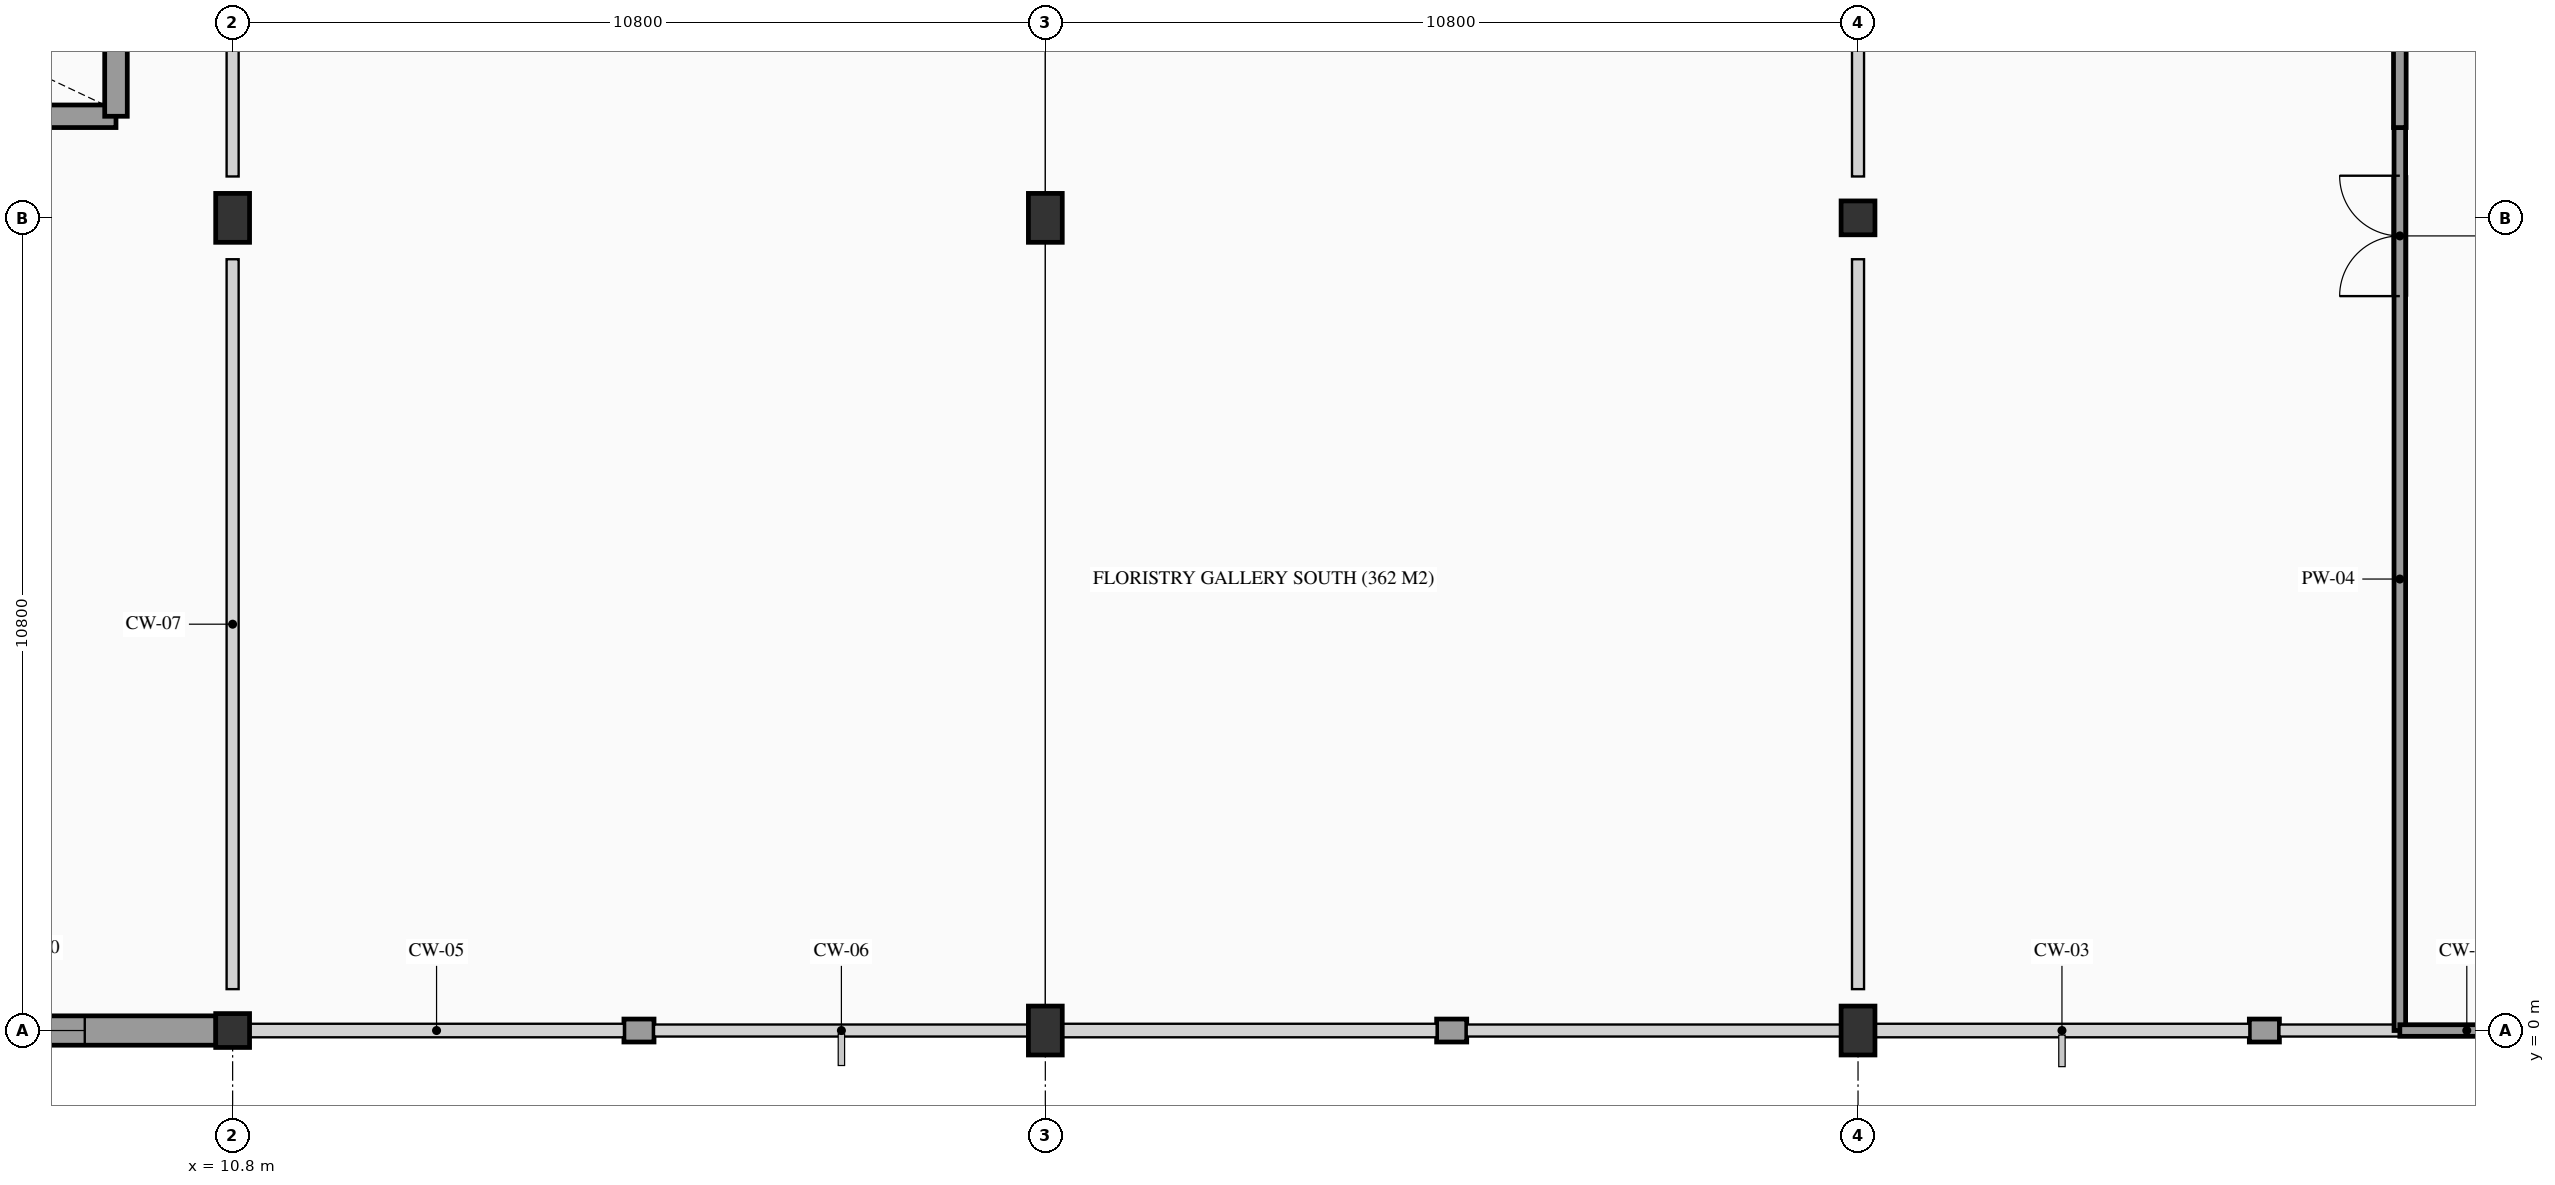
"""IFC4 building model, lengths in metres.
Left out: names, types, materials, properties, quantities, classifications, styles, units other than length and angle.
Written with IfcOpenShell. Run it as: python <this file> out.ifc"""

import sys

from ifc_helpers import new_model, si_unit, direction, frame, frame_2d, origin, origin_2d, place, context, subcontext, project, spatial, rectangle, extrude, element, fill, save


model = new_model("IFC4")
c1 = context("Model", 3, precision=1e-05, world=origin(), true_north=direction((0.0, 1.0)))
c2 = subcontext(c1, "Body", "Model", "MODEL_VIEW")
j1 = project(units=[si_unit("LENGTHUNIT", "METRE"), si_unit("PLANEANGLEUNIT", "RADIAN")], contexts=[c1])
p1 = place(None, origin())
s1 = spatial("IfcSite", under=j1, at=p1, CompositionType="ELEMENT")
p2 = place(p1, origin())
s2 = spatial("IfcBuilding", under=s1, at=p2, CompositionType="ELEMENT")
p3 = place(p2, frame((0.0, 0.0, 5.4)))
s3 = spatial("IfcBuildingStorey", under=s2, at=p3, CompositionType="ELEMENT", Elevation=5.4)
p4 = place(p3, frame((10.8, 0.0, 0.0), z_axis=(0.0, 0.0, 1.0), x_axis=(1.0, 0.0, 0.0)))
e1 = element("IfcColumn", 1, at=p4, inside=s3, PredefinedType="COLUMN", context=c2, shape_type="SweptSolid", body=[
    extrude(rectangle(XDim=0.45, YDim=0.45, at=origin_2d()), origin(), (0.0, 0.0, 1.0), 4.68),
])
for number, where, z_axis, x_axis in (
    (2, (10.8, 10.8, 0.0), (0.0, 0.0, 1.0), (1.0, 0.0, 0.0)),
    (3, (21.6, 0.0, 0.0), (0.0, 0.0, 1.0), (1.0, 0.0, 0.0)),
    (4, (21.6, 10.8, 0.0), (0.0, 0.0, 1.0), (1.0, 0.0, 0.0)),
    (5, (32.4, 0.0, 0.0), (0.0, 0.0, 1.0), (1.0, 0.0, 0.0)),
):
    element("IfcColumn", number, at=place(p3, frame(where, z_axis=z_axis, x_axis=x_axis)), inside=s3, PredefinedType="COLUMN", context=c2, shape_type="SweptSolid", body=[
        extrude(rectangle(XDim=0.45, YDim=0.65, at=origin_2d()), origin(), (0.0, 0.0, 1.0), 4.68),
    ])
p5 = place(p3, frame((32.4, 10.8, 0.0), z_axis=(0.0, 0.0, 1.0), x_axis=(1.0, 0.0, 0.0)))
e6 = element("IfcColumn", 6, at=p5, inside=s3, PredefinedType="COLUMN", context=c2, shape_type="SweptSolid", body=[
    extrude(rectangle(XDim=0.45, YDim=0.45, at=origin_2d()), origin(), (0.0, 0.0, 1.0), 4.68),
])
p6 = place(p3, frame((0.22, 0.0, 0.0), z_axis=(0.0, 0.0, 1.0), x_axis=(1.0, 0.0, 0.0)))
e7 = element("IfcWall", 7, at=p6, inside=s3, PredefinedType="STANDARD", context=c2, shape_type="SweptSolid", body=[
    extrude(rectangle(XDim=10.36, YDim=0.39, at=frame_2d((5.18, 0.0))), origin(), (0.0, 0.0, 1.0), 3.53),
])
p7 = place(p6, frame((1.465, 0.0, 0.95)))
e8 = element("IfcOpeningElement", 8, at=p7, cuts=e7, PredefinedType="OPENING", context=c2, shape_type="SweptSolid", body=[
    extrude(rectangle(XDim=1.17, YDim=1.95, at=frame_2d((0.585, 0.975))), frame((0.0, 0.205, 0.0), z_axis=(0.0, -1.0, 0.0), x_axis=(1.0, 0.0, 0.0)), (0.0, 0.0, 1.0), 0.41),
])
p8 = place(p6, frame((4.335, 0.0, 0.95)))
e9 = element("IfcOpeningElement", 9, at=p8, cuts=e7, PredefinedType="OPENING", context=c2, shape_type="SweptSolid", body=[
    extrude(rectangle(XDim=1.29, YDim=1.95, at=frame_2d((0.645, 0.975))), frame((0.0, 0.205, 0.0), z_axis=(0.0, -1.0, 0.0), x_axis=(1.0, 0.0, 0.0)), (0.0, 0.0, 1.0), 0.41),
])
p9 = place(p6, frame((7.205, 0.0, 0.95)))
e10 = element("IfcOpeningElement", 10, at=p9, cuts=e7, PredefinedType="OPENING", context=c2, shape_type="SweptSolid", body=[
    extrude(rectangle(XDim=1.41, YDim=1.95, at=frame_2d((0.705, 0.975))), frame((0.0, 0.205, 0.0), z_axis=(0.0, -1.0, 0.0), x_axis=(1.0, 0.0, 0.0)), (0.0, 0.0, 1.0), 0.41),
])
for number, where, z_axis, x_axis in (
    (11, (16.0, 0.0, 0.0), (0.0, 0.0, 1.0), (1.0, 0.0, 0.0)),
    (12, (26.8, 0.0, 0.0), (0.0, 0.0, 1.0), (1.0, 0.0, 0.0)),
    (13, (37.6, 0.0, 0.0), (0.0, 0.0, 1.0), (1.0, 0.0, 0.0)),
):
    element("IfcWall", number, at=place(p3, frame(where, z_axis=z_axis, x_axis=x_axis)), inside=s3, PredefinedType="STANDARD", context=c2, shape_type="SweptSolid", body=[
        extrude(rectangle(XDim=0.4, YDim=0.305, at=frame_2d((0.2, 0.0))), origin(), (0.0, 0.0, 1.0), 3.53),
    ])
p10 = place(p3, frame((1.35, 12.15, 0.0), z_axis=(0.0, 0.0, 1.0), x_axis=(1.0, 0.0, 0.0)))
e14 = element("IfcWall", 14, at=p10, inside=s3, PredefinedType="SHEAR", context=c2, shape_type="SweptSolid", body=[
    extrude(rectangle(XDim=7.9, YDim=0.3, at=frame_2d((3.95, 0.0))), origin(), (0.0, 0.0, 1.0), 4.68),
])
p11 = place(p3, frame((9.25, 12.15, 0.0), z_axis=(0.0, 0.0, 1.0), x_axis=(0.0, 1.0, 0.0)))
e15 = element("IfcWall", 15, at=p11, inside=s3, PredefinedType="SHEAR", context=c2, shape_type="SweptSolid", body=[
    extrude(rectangle(XDim=3.9, YDim=0.3, at=frame_2d((1.95, 0.0))), origin(), (0.0, 0.0, 1.0), 4.68),
])
p12 = place(p3, frame((39.6, 0.0, 0.0), z_axis=(0.0, 0.0, 1.0), x_axis=(0.0, 1.0, 0.0)))
e16 = element("IfcWall", 16, at=p12, inside=s3, PredefinedType="PARTITIONING", context=c2, shape_type="SweptSolid", body=[
    extrude(rectangle(XDim=12.0, YDim=0.154, at=frame_2d((6.0, 0.0))), origin(), (0.0, 0.0, 1.0), 3.23),
])
p13 = place(p12, frame((9.76, 0.0, 0.0)))
e17 = element("IfcOpeningElement", 17, at=p13, cuts=e16, PredefinedType="OPENING", context=c2, shape_type="SweptSolid", body=[
    extrude(rectangle(XDim=1.6, YDim=2.2, at=frame_2d((0.8, 1.1))), frame((0.0, 0.087, 0.0), z_axis=(0.0, -1.0, 0.0), x_axis=(1.0, 0.0, 0.0)), (0.0, 0.0, 1.0), 0.174),
])
p14 = place(p3, frame((39.6, 0.0, 0.0), z_axis=(0.0, 0.0, 1.0), x_axis=(1.0, 0.0, 0.0)))
e18 = element("IfcWall", 18, at=p14, inside=s3, PredefinedType="PARTITIONING", context=c2, shape_type="SweptSolid", body=[
    extrude(rectangle(XDim=3.6, YDim=0.154, at=frame_2d((1.8, 0.0))), origin(), (0.0, 0.0, 1.0), 3.23),
])
p15 = place(p3, frame((39.6, 12.0, 0.0), z_axis=(0.0, 0.0, 1.0), x_axis=(0.0, 1.0, 0.0)))
e19 = element("IfcWall", 19, at=p15, inside=s3, PredefinedType="PARTITIONING", context=c2, shape_type="SweptSolid", body=[
    extrude(rectangle(XDim=4.8, YDim=0.168, at=frame_2d((2.4, 0.0))), origin(), (0.0, 0.0, 1.0), 3.23),
])
p16 = place(p9, frame((1.41, 0.0, 0.0), z_axis=(0.0, 0.0, 1.0), x_axis=(-1.0, 0.0, 0.0)))
e20 = element("IfcWindow", 20, at=p16, inside=s3, PartitioningType="SINGLE_PANEL", PredefinedType="WINDOW", context=c2, shape_type="SweptSolid", body=[
    extrude(rectangle(XDim=1.41, YDim=1.95, at=frame_2d((0.705, 0.975))), frame((0.0, 0.03, 0.0), z_axis=(0.0, -1.0, 0.0), x_axis=(1.0, 0.0, 0.0)), (0.0, 0.0, 1.0), 0.06),
])
fill(e10, e20)
p17 = place(p13, origin())
e21 = element("IfcDoor", 21, at=p17, inside=s3, OperationType="DOUBLE_DOOR_SINGLE_SWING", PredefinedType="DOOR", context=c2, shape_type="SweptSolid", body=[
    extrude(rectangle(XDim=1.6, YDim=2.2, at=frame_2d((0.8, 1.1))), frame((0.0, 0.025, 0.0), z_axis=(0.0, -1.0, 0.0), x_axis=(1.0, 0.0, 0.0)), (0.0, 0.0, 1.0), 0.05),
])
fill(e17, e21)
save(model, sys.argv[1])
